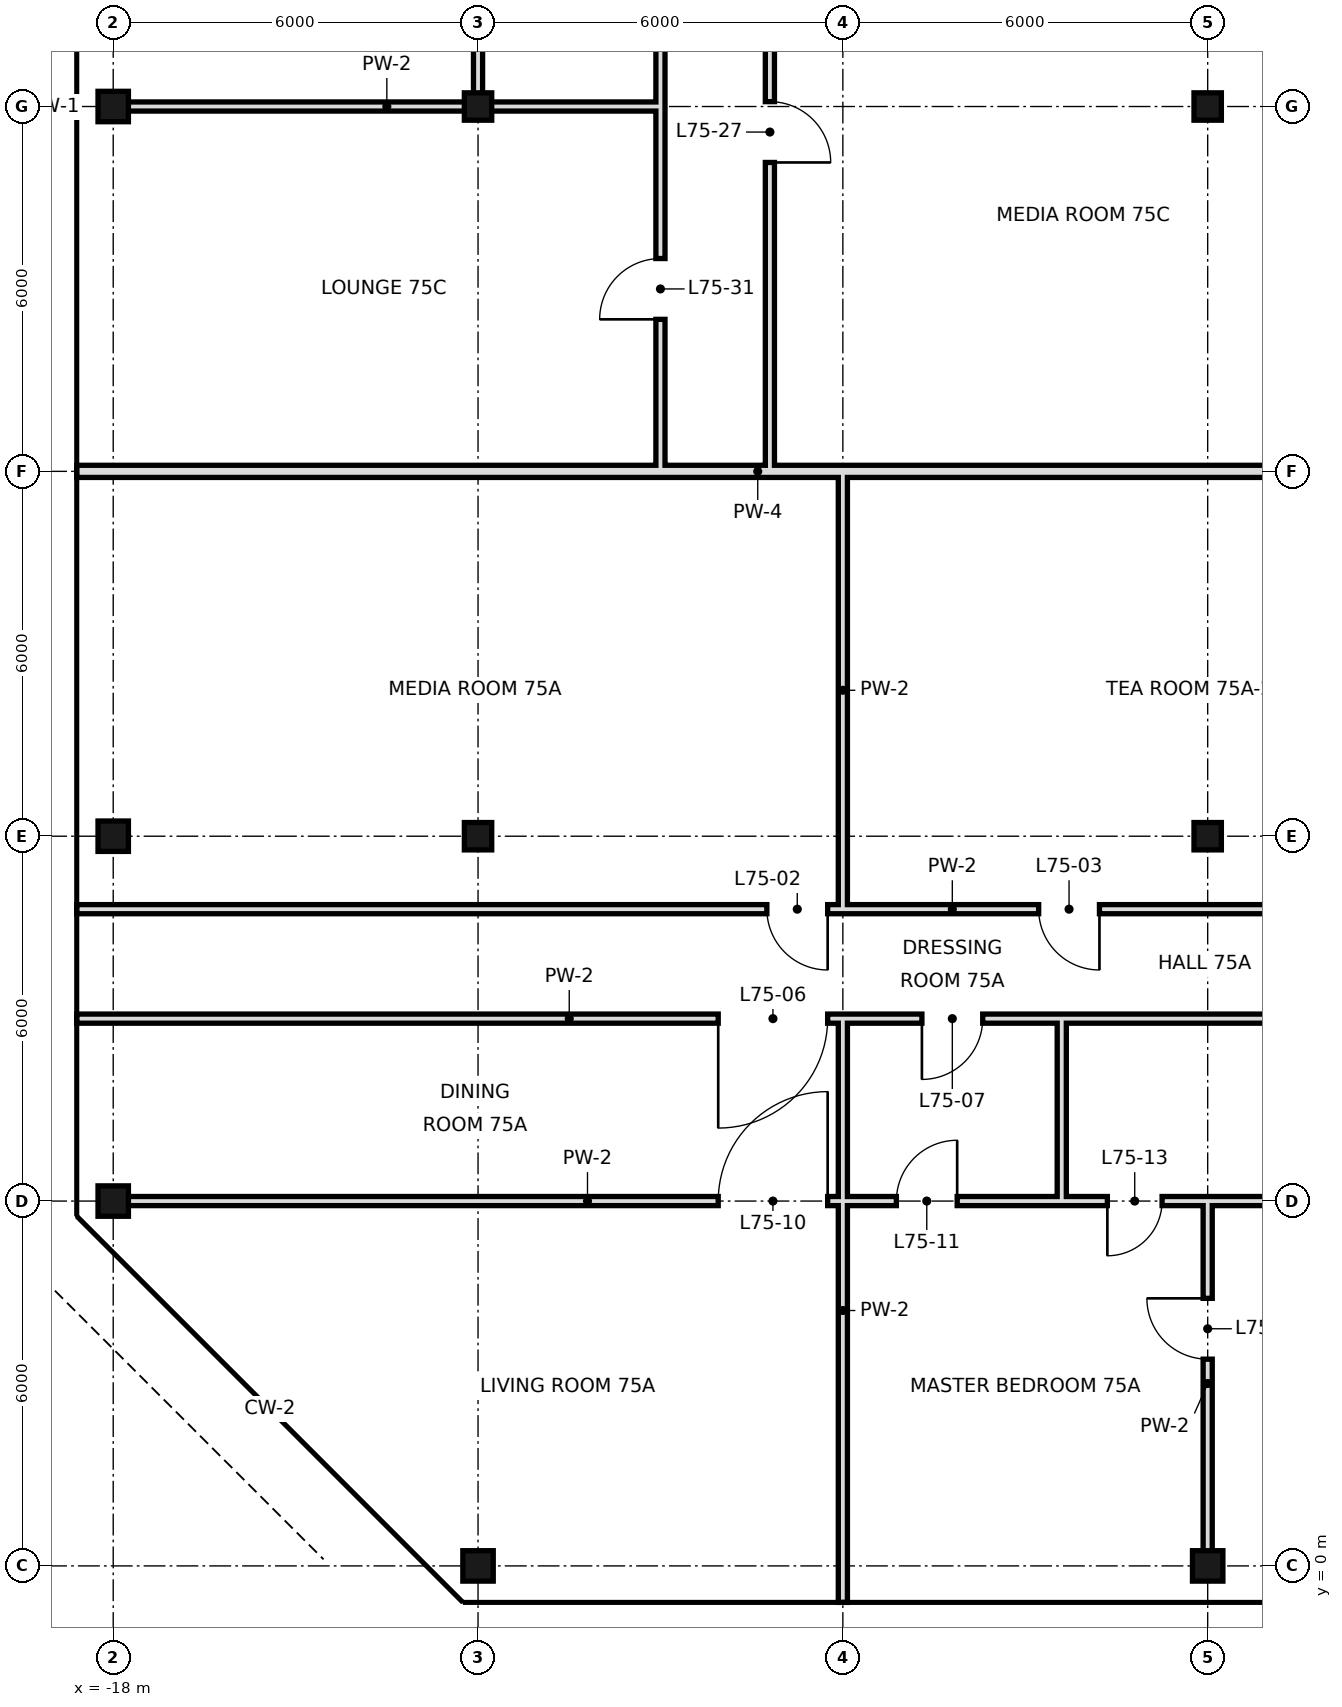
"""IFC4 building model, lengths in metres.
Left out: names, types, materials, properties, quantities, classifications, styles, units other than length and angle.
Written with IfcOpenShell. Run it as: python <this file> out.ifc"""

import sys

from ifc_helpers import new_model, si_unit, direction, frame, frame_2d, origin, origin_with_axes, origin_2d, place, context, subcontext, project, spatial, rectangle, hollow_rectangle, extrude, element, fill, save


model = new_model("IFC4")
c1 = context("Model", 3, precision=1e-05, world=origin(), true_north=direction((0.0, 1.0)))
c2 = subcontext(c1, "Body", "Model", "MODEL_VIEW")
j1 = project(units=[si_unit("LENGTHUNIT", "METRE"), si_unit("PLANEANGLEUNIT", "RADIAN")], contexts=[c1])
p1 = place(None, origin())
s1 = spatial("IfcSite", under=j1, at=p1, CompositionType="ELEMENT")
p2 = place(p1, origin())
s2 = spatial("IfcBuilding", under=s1, at=p2, CompositionType="ELEMENT")
p3 = place(p2, frame((0.0, 0.0, 316.0)))
s3 = spatial("IfcBuildingStorey", under=s2, at=p3, CompositionType="ELEMENT", Elevation=316.0)
for number, where, z_axis, x_axis in (
    (1, (-18.0, 6.0, 0.0), (0.0, 0.0, 1.0), (1.0, 0.0, 0.0)),
    (2, (-18.0, 12.0, 0.0), (0.0, 0.0, 1.0), (1.0, 0.0, 0.0)),
    (3, (-18.0, 24.0, 0.0), (0.0, 0.0, 1.0), (1.0, 0.0, 0.0)),
    (4, (-12.0, 0.0, 0.0), (0.0, 0.0, 1.0), (1.0, 0.0, 0.0)),
):
    element("IfcColumn", number, at=place(p3, frame(where, z_axis=z_axis, x_axis=x_axis)), inside=s3, PredefinedType="COLUMN", context=c2, shape_type="SweptSolid", body=[
        extrude(hollow_rectangle(XDim=0.5, YDim=0.5, WallThickness=0.025, at=origin_2d()), origin(), (0.0, 0.0, 1.0), 3.6),
    ])
for number, where, z_axis, x_axis in (
    (5, (-12.0, 12.0, 0.0), (0.0, 0.0, 1.0), (1.0, 0.0, 0.0)),
    (6, (-12.0, 24.0, 0.0), (0.0, 0.0, 1.0), (1.0, 0.0, 0.0)),
):
    element("IfcColumn", number, at=place(p3, frame(where, z_axis=z_axis, x_axis=x_axis)), inside=s3, PredefinedType="COLUMN", context=c2, shape_type="SweptSolid", body=[
        extrude(hollow_rectangle(XDim=0.45, YDim=0.45, WallThickness=0.022, at=origin_2d()), origin(), (0.0, 0.0, 1.0), 3.6),
    ])
p4 = place(p3, origin_with_axes())
e7 = element("IfcColumn", 7, at=p4, inside=s3, PredefinedType="COLUMN", context=c2, shape_type="SweptSolid", body=[
    extrude(hollow_rectangle(XDim=0.5, YDim=0.5, WallThickness=0.025, at=origin_2d()), origin(), (0.0, 0.0, 1.0), 3.6),
])
for number, where, z_axis, x_axis in (
    (8, (0.0, 12.0, 0.0), (0.0, 0.0, 1.0), (1.0, 0.0, 0.0)),
    (9, (0.0, 24.0, 0.0), (0.0, 0.0, 1.0), (1.0, 0.0, 0.0)),
):
    element("IfcColumn", number, at=place(p3, frame(where, z_axis=z_axis, x_axis=x_axis)), inside=s3, PredefinedType="COLUMN", context=c2, shape_type="SweptSolid", body=[
        extrude(hollow_rectangle(XDim=0.45, YDim=0.45, WallThickness=0.022, at=origin_2d()), origin(), (0.0, 0.0, 1.0), 3.6),
    ])
p5 = place(p3, frame((-12.0, 24.0, 0.0), z_axis=(0.0, 0.0, 1.0), x_axis=(0.0, 1.0, 0.0)))
e10 = element("IfcWall", 10, at=p5, inside=s3, PredefinedType="PARTITIONING", context=c2, shape_type="SweptSolid", body=[
    extrude(rectangle(XDim=12.0, YDim=0.15, at=frame_2d((6.0, 0.0))), origin(), (0.0, 0.0, 1.0), 2.72),
])
p6 = place(p5, frame((5.1, 0.0, 0.0)))
e11 = element("IfcOpeningElement", 11, at=p6, cuts=e10, PredefinedType="OPENING", context=c2, shape_type="SweptSolid", body=[
    extrude(rectangle(XDim=1.8, YDim=2.4, at=frame_2d((0.9, 1.2))), frame((0.0, 0.085, 0.0), z_axis=(0.0, -1.0, 0.0), x_axis=(1.0, 0.0, 0.0)), (0.0, 0.0, 1.0), 0.17),
])
p7 = place(p3, frame((-2.4, 6.0, 0.0), z_axis=(0.0, 0.0, 1.0), x_axis=(0.0, 1.0, 0.0)))
e12 = element("IfcWall", 12, at=p7, inside=s3, PredefinedType="PARTITIONING", context=c2, shape_type="SweptSolid", body=[
    extrude(rectangle(XDim=3.0, YDim=0.15, at=frame_2d((1.5, 0.0))), origin(), (0.0, 0.0, 1.0), 3.42),
])
p8 = place(p3, frame((-6.0, -0.6, 0.0), z_axis=(0.0, 0.0, 1.0), x_axis=(0.0, 1.0, 0.0)))
e13 = element("IfcWall", 13, at=p8, inside=s3, PredefinedType="PARTITIONING", context=c2, shape_type="SweptSolid", body=[
    extrude(rectangle(XDim=9.6, YDim=0.15, at=frame_2d((4.8, 0.0))), origin(), (0.0, 0.0, 1.0), 3.42),
])
p9 = place(p3, frame((-6.0, 10.8, 0.0), z_axis=(0.0, 0.0, 1.0), x_axis=(0.0, 1.0, 0.0)))
e14 = element("IfcWall", 14, at=p9, inside=s3, PredefinedType="PARTITIONING", context=c2, shape_type="SweptSolid", body=[
    extrude(rectangle(XDim=7.2, YDim=0.15, at=frame_2d((3.6, 0.0))), origin(), (0.0, 0.0, 1.0), 3.42),
])
p10 = place(p3, frame((-7.2, 18.0, 0.0), z_axis=(0.0, 0.0, 1.0), x_axis=(0.0, 1.0, 0.0)))
e15 = element("IfcWall", 15, at=p10, inside=s3, PredefinedType="PARTITIONING", context=c2, shape_type="SweptSolid", body=[
    extrude(rectangle(XDim=23.4, YDim=0.15, at=frame_2d((11.7, 0.0))), origin(), (0.0, 0.0, 1.0), 3.42),
])
p11 = place(p10, frame((9.7, 0.0, 0.0)))
e16 = element("IfcOpeningElement", 16, at=p11, cuts=e15, PredefinedType="OPENING", context=c2, shape_type="SweptSolid", body=[
    extrude(rectangle(XDim=1.0, YDim=2.4, at=frame_2d((0.5, 1.2))), frame((0.0, 0.085, 0.0), z_axis=(0.0, -1.0, 0.0), x_axis=(1.0, 0.0, 0.0)), (0.0, 0.0, 1.0), 0.17),
])
p12 = place(p10, frame((5.08, 0.0, 0.0)))
e17 = element("IfcOpeningElement", 17, at=p12, cuts=e15, PredefinedType="OPENING", context=c2, shape_type="SweptSolid", body=[
    extrude(rectangle(XDim=1.0, YDim=2.4, at=frame_2d((0.5, 1.2))), frame((0.0, 0.085, 0.0), z_axis=(0.0, -1.0, 0.0), x_axis=(1.0, 0.0, 0.0)), (0.0, 0.0, 1.0), 0.17),
])
p13 = place(p10, frame((15.22, 0.0, 0.0)))
e18 = element("IfcOpeningElement", 18, at=p13, cuts=e15, PredefinedType="OPENING", context=c2, shape_type="SweptSolid", body=[
    extrude(rectangle(XDim=1.0, YDim=2.4, at=frame_2d((0.5, 1.2))), frame((0.0, 0.085, 0.0), z_axis=(0.0, -1.0, 0.0), x_axis=(1.0, 0.0, 0.0)), (0.0, 0.0, 1.0), 0.17),
])
p14 = place(p3, frame((-9.0, 18.0, 0.0), z_axis=(0.0, 0.0, 1.0), x_axis=(0.0, 1.0, 0.0)))
e19 = element("IfcWall", 19, at=p14, inside=s3, PredefinedType="PARTITIONING", context=c2, shape_type="SweptSolid", body=[
    extrude(rectangle(XDim=18.0, YDim=0.15, at=frame_2d((9.0, 0.0))), origin(), (0.0, 0.0, 1.0), 3.42),
])
p15 = place(p14, frame((2.5, 0.0, 0.0)))
e20 = element("IfcOpeningElement", 20, at=p15, cuts=e19, PredefinedType="OPENING", context=c2, shape_type="SweptSolid", body=[
    extrude(rectangle(XDim=1.0, YDim=2.4, at=frame_2d((0.5, 1.2))), frame((0.0, 0.085, 0.0), z_axis=(0.0, -1.0, 0.0), x_axis=(1.0, 0.0, 0.0)), (0.0, 0.0, 1.0), 0.17),
])
p16 = place(p14, frame((13.04, 0.0, 0.0)))
e21 = element("IfcOpeningElement", 21, at=p16, cuts=e19, PredefinedType="OPENING", context=c2, shape_type="SweptSolid", body=[
    extrude(rectangle(XDim=1.8, YDim=2.4, at=frame_2d((0.9, 1.2))), frame((0.0, 0.085, 0.0), z_axis=(0.0, -1.0, 0.0), x_axis=(1.0, 0.0, 0.0)), (0.0, 0.0, 1.0), 0.17),
])
p17 = place(p3, frame((0.0, 0.0, 0.0), z_axis=(0.0, 0.0, 1.0), x_axis=(0.0, 1.0, 0.0)))
e22 = element("IfcWall", 22, at=p17, inside=s3, PredefinedType="PARTITIONING", context=c2, shape_type="SweptSolid", body=[
    extrude(rectangle(XDim=6.0, YDim=0.15, at=frame_2d((3.0, 0.0))), origin(), (0.0, 0.0, 1.0), 2.72),
])
p18 = place(p17, frame((3.4, 0.0, 0.0)))
e23 = element("IfcOpeningElement", 23, at=p18, cuts=e22, PredefinedType="OPENING", context=c2, shape_type="SweptSolid", body=[
    extrude(rectangle(XDim=1.0, YDim=2.4, at=frame_2d((0.5, 1.2))), frame((0.0, 0.085, 0.0), z_axis=(0.0, -1.0, 0.0), x_axis=(1.0, 0.0, 0.0)), (0.0, 0.0, 1.0), 0.17),
])
p19 = place(p3, frame((-18.6, 10.8, 0.0), z_axis=(0.0, 0.0, 1.0), x_axis=(1.0, 0.0, 0.0)))
e24 = element("IfcWall", 24, at=p19, inside=s3, PredefinedType="PARTITIONING", context=c2, shape_type="SweptSolid", body=[
    extrude(rectangle(XDim=28.8, YDim=0.15, at=frame_2d((14.4, 0.0))), origin(), (0.0, 0.0, 1.0), 3.42),
])
p20 = place(p19, frame((25.9, 0.0, 0.0)))
e25 = element("IfcOpeningElement", 25, at=p20, cuts=e24, PredefinedType="OPENING", context=c2, shape_type="SweptSolid", body=[
    extrude(rectangle(XDim=1.0, YDim=2.4, at=frame_2d((0.5, 1.2))), frame((0.0, 0.085, 0.0), z_axis=(0.0, -1.0, 0.0), x_axis=(1.0, 0.0, 0.0)), (0.0, 0.0, 1.0), 0.17),
])
p21 = place(p19, frame((11.35, 0.0, 0.0)))
e26 = element("IfcOpeningElement", 26, at=p21, cuts=e24, PredefinedType="OPENING", context=c2, shape_type="SweptSolid", body=[
    extrude(rectangle(XDim=1.0, YDim=2.4, at=frame_2d((0.5, 1.2))), frame((0.0, 0.085, 0.0), z_axis=(0.0, -1.0, 0.0), x_axis=(1.0, 0.0, 0.0)), (0.0, 0.0, 1.0), 0.17),
])
p22 = place(p19, frame((15.82, 0.0, 0.0)))
e27 = element("IfcOpeningElement", 27, at=p22, cuts=e24, PredefinedType="OPENING", context=c2, shape_type="SweptSolid", body=[
    extrude(rectangle(XDim=1.0, YDim=2.4, at=frame_2d((0.5, 1.2))), frame((0.0, 0.085, 0.0), z_axis=(0.0, -1.0, 0.0), x_axis=(1.0, 0.0, 0.0)), (0.0, 0.0, 1.0), 0.17),
])
p23 = place(p3, frame((-18.6, 18.0, 0.0), z_axis=(0.0, 0.0, 1.0), x_axis=(1.0, 0.0, 0.0)))
e28 = element("IfcWall", 28, at=p23, inside=s3, PredefinedType="SOLIDWALL", context=c2, shape_type="SweptSolid", body=[
    extrude(rectangle(XDim=21.7, YDim=0.2, at=frame_2d((10.85, 0.0))), origin(), (0.0, 0.0, 1.0), 2.72),
])
p24 = place(p3, frame((-18.0, 24.0, 0.0), z_axis=(0.0, 0.0, 1.0), x_axis=(1.0, 0.0, 0.0)))
e29 = element("IfcWall", 29, at=p24, inside=s3, PredefinedType="PARTITIONING", context=c2, shape_type="SweptSolid", body=[
    extrude(rectangle(XDim=9.0, YDim=0.15, at=frame_2d((4.5, 0.0))), origin(), (0.0, 0.0, 1.0), 2.72),
])
p25 = place(p3, frame((-18.0, 6.0, 0.0), z_axis=(0.0, 0.0, 1.0), x_axis=(1.0, 0.0, 0.0)))
e30 = element("IfcWall", 30, at=p25, inside=s3, PredefinedType="PARTITIONING", context=c2, shape_type="SweptSolid", body=[
    extrude(rectangle(XDim=15.6, YDim=0.15, at=frame_2d((7.8, 0.0))), origin(), (0.0, 0.0, 1.0), 2.72),
])
p26 = place(p25, frame((9.95, 0.0, 0.0)))
e31 = element("IfcOpeningElement", 31, at=p26, cuts=e30, PredefinedType="OPENING", context=c2, shape_type="SweptSolid", body=[
    extrude(rectangle(XDim=1.8, YDim=2.4, at=frame_2d((0.9, 1.2))), frame((0.0, 0.085, 0.0), z_axis=(0.0, -1.0, 0.0), x_axis=(1.0, 0.0, 0.0)), (0.0, 0.0, 1.0), 0.17),
])
p27 = place(p25, frame((12.88, 0.0, 0.0)))
e32 = element("IfcOpeningElement", 32, at=p27, cuts=e30, PredefinedType="OPENING", context=c2, shape_type="SweptSolid", body=[
    extrude(rectangle(XDim=1.0, YDim=2.4, at=frame_2d((0.5, 1.2))), frame((0.0, 0.085, 0.0), z_axis=(0.0, -1.0, 0.0), x_axis=(1.0, 0.0, 0.0)), (0.0, 0.0, 1.0), 0.17),
])
p28 = place(p3, frame((-2.4, 6.0, 0.0), z_axis=(0.0, 0.0, 1.0), x_axis=(1.0, 0.0, 0.0)))
e33 = element("IfcWall", 33, at=p28, inside=s3, PredefinedType="PARTITIONING", context=c2, shape_type="SweptSolid", body=[
    extrude(rectangle(XDim=8.4, YDim=0.15, at=frame_2d((4.2, 0.0))), origin(), (0.0, 0.0, 1.0), 2.72),
])
p29 = place(p28, frame((0.75, 0.0, 0.0)))
e34 = element("IfcOpeningElement", 34, at=p29, cuts=e33, PredefinedType="OPENING", context=c2, shape_type="SweptSolid", body=[
    extrude(rectangle(XDim=0.9, YDim=2.4, at=frame_2d((0.45, 1.2))), frame((0.0, 0.085, 0.0), z_axis=(0.0, -1.0, 0.0), x_axis=(1.0, 0.0, 0.0)), (0.0, 0.0, 1.0), 0.17),
])
p30 = place(p3, frame((-18.6, 9.0, 0.0), z_axis=(0.0, 0.0, 1.0), x_axis=(1.0, 0.0, 0.0)))
e35 = element("IfcWall", 35, at=p30, inside=s3, PredefinedType="PARTITIONING", context=c2, shape_type="SweptSolid", body=[
    extrude(rectangle(XDim=16.2, YDim=0.15, at=frame_2d((8.1, 0.0))), origin(), (0.0, 0.0, 1.0), 3.42),
])
p31 = place(p30, frame((10.55, 0.0, 0.0)))
e36 = element("IfcOpeningElement", 36, at=p31, cuts=e35, PredefinedType="OPENING", context=c2, shape_type="SweptSolid", body=[
    extrude(rectangle(XDim=1.8, YDim=2.4, at=frame_2d((0.9, 1.2))), frame((0.0, 0.085, 0.0), z_axis=(0.0, -1.0, 0.0), x_axis=(1.0, 0.0, 0.0)), (0.0, 0.0, 1.0), 0.17),
])
p32 = place(p30, frame((13.9, 0.0, 0.0)))
e37 = element("IfcOpeningElement", 37, at=p32, cuts=e35, PredefinedType="OPENING", context=c2, shape_type="SweptSolid", body=[
    extrude(rectangle(XDim=1.0, YDim=2.4, at=frame_2d((0.5, 1.2))), frame((0.0, 0.085, 0.0), z_axis=(0.0, -1.0, 0.0), x_axis=(1.0, 0.0, 0.0)), (0.0, 0.0, 1.0), 0.17),
])
p33 = place(p3, frame((-2.4, 9.0, 0.0), z_axis=(0.0, 0.0, 1.0), x_axis=(1.0, 0.0, 0.0)))
e38 = element("IfcWall", 38, at=p33, inside=s3, PredefinedType="PARTITIONING", context=c2, shape_type="SweptSolid", body=[
    extrude(rectangle(XDim=8.4, YDim=0.15, at=frame_2d((4.2, 0.0))), origin(), (0.0, 0.0, 1.0), 3.42),
])
p34 = place(p21, origin())
e39 = element("IfcDoor", 39, at=p34, inside=s3, OperationType="SINGLE_SWING_RIGHT", PredefinedType="DOOR", context=c2, shape_type="SweptSolid", body=[
    extrude(rectangle(XDim=1.0, YDim=2.4, at=frame_2d((0.5, 1.2))), frame((0.0, 0.025, 0.0), z_axis=(0.0, -1.0, 0.0), x_axis=(1.0, 0.0, 0.0)), (0.0, 0.0, 1.0), 0.05),
])
fill(e26, e39)
p35 = place(p22, origin())
e40 = element("IfcDoor", 40, at=p35, inside=s3, OperationType="SINGLE_SWING_RIGHT", PredefinedType="DOOR", context=c2, shape_type="SweptSolid", body=[
    extrude(rectangle(XDim=1.0, YDim=2.4, at=frame_2d((0.5, 1.2))), frame((0.0, 0.025, 0.0), z_axis=(0.0, -1.0, 0.0), x_axis=(1.0, 0.0, 0.0)), (0.0, 0.0, 1.0), 0.05),
])
fill(e27, e40)
p36 = place(p31, frame((1.8, 0.0, 0.0), z_axis=(0.0, 0.0, 1.0), x_axis=(-1.0, 0.0, 0.0)))
e41 = element("IfcDoor", 41, at=p36, inside=s3, OperationType="SINGLE_SWING_RIGHT", PredefinedType="DOOR", context=c2, shape_type="SweptSolid", body=[
    extrude(rectangle(XDim=1.8, YDim=2.4, at=frame_2d((0.9, 1.2))), frame((0.0, 0.025, 0.0), z_axis=(0.0, -1.0, 0.0), x_axis=(1.0, 0.0, 0.0)), (0.0, 0.0, 1.0), 0.05),
])
fill(e36, e41)
p37 = place(p32, frame((1.0, 0.0, 0.0), z_axis=(0.0, 0.0, 1.0), x_axis=(-1.0, 0.0, 0.0)))
e42 = element("IfcDoor", 42, at=p37, inside=s3, OperationType="SINGLE_SWING_RIGHT", PredefinedType="DOOR", context=c2, shape_type="SweptSolid", body=[
    extrude(rectangle(XDim=1.0, YDim=2.4, at=frame_2d((0.5, 1.2))), frame((0.0, 0.025, 0.0), z_axis=(0.0, -1.0, 0.0), x_axis=(1.0, 0.0, 0.0)), (0.0, 0.0, 1.0), 0.05),
])
fill(e37, e42)
p38 = place(p26, frame((1.8, 0.0, 0.0), z_axis=(0.0, 0.0, 1.0), x_axis=(-1.0, 0.0, 0.0)))
e43 = element("IfcDoor", 43, at=p38, inside=s3, OperationType="SINGLE_SWING_LEFT", PredefinedType="DOOR", context=c2, shape_type="SweptSolid", body=[
    extrude(rectangle(XDim=1.8, YDim=2.4, at=frame_2d((0.9, 1.2))), frame((0.0, 0.025, 0.0), z_axis=(0.0, -1.0, 0.0), x_axis=(1.0, 0.0, 0.0)), (0.0, 0.0, 1.0), 0.05),
])
fill(e31, e43)
p39 = place(p27, frame((1.0, 0.0, 0.0), z_axis=(0.0, 0.0, 1.0), x_axis=(-1.0, 0.0, 0.0)))
e44 = element("IfcDoor", 44, at=p39, inside=s3, OperationType="SINGLE_SWING_LEFT", PredefinedType="DOOR", context=c2, shape_type="SweptSolid", body=[
    extrude(rectangle(XDim=1.0, YDim=2.4, at=frame_2d((0.5, 1.2))), frame((0.0, 0.025, 0.0), z_axis=(0.0, -1.0, 0.0), x_axis=(1.0, 0.0, 0.0)), (0.0, 0.0, 1.0), 0.05),
])
fill(e32, e44)
p40 = place(p18, frame((1.0, 0.0, 0.0), z_axis=(0.0, 0.0, 1.0), x_axis=(-1.0, 0.0, 0.0)))
e45 = element("IfcDoor", 45, at=p40, inside=s3, OperationType="SINGLE_SWING_LEFT", PredefinedType="DOOR", context=c2, shape_type="SweptSolid", body=[
    extrude(rectangle(XDim=1.0, YDim=2.4, at=frame_2d((0.5, 1.2))), frame((0.0, 0.025, 0.0), z_axis=(0.0, -1.0, 0.0), x_axis=(1.0, 0.0, 0.0)), (0.0, 0.0, 1.0), 0.05),
])
fill(e23, e45)
p41 = place(p29, frame((0.9, 0.0, 0.0), z_axis=(0.0, 0.0, 1.0), x_axis=(-1.0, 0.0, 0.0)))
e46 = element("IfcDoor", 46, at=p41, inside=s3, OperationType="SINGLE_SWING_RIGHT", PredefinedType="DOOR", context=c2, shape_type="SweptSolid", body=[
    extrude(rectangle(XDim=0.9, YDim=2.4, at=frame_2d((0.45, 1.2))), frame((0.0, 0.025, 0.0), z_axis=(0.0, -1.0, 0.0), x_axis=(1.0, 0.0, 0.0)), (0.0, 0.0, 1.0), 0.05),
])
fill(e34, e46)
p42 = place(p12, frame((1.0, 0.0, 0.0), z_axis=(0.0, 0.0, 1.0), x_axis=(-1.0, 0.0, 0.0)))
e47 = element("IfcDoor", 47, at=p42, inside=s3, OperationType="SINGLE_SWING_RIGHT", PredefinedType="DOOR", context=c2, shape_type="SweptSolid", body=[
    extrude(rectangle(XDim=1.0, YDim=2.4, at=frame_2d((0.5, 1.2))), frame((0.0, 0.025, 0.0), z_axis=(0.0, -1.0, 0.0), x_axis=(1.0, 0.0, 0.0)), (0.0, 0.0, 1.0), 0.05),
])
fill(e17, e47)
p43 = place(p15, origin())
e48 = element("IfcDoor", 48, at=p43, inside=s3, OperationType="SINGLE_SWING_LEFT", PredefinedType="DOOR", context=c2, shape_type="SweptSolid", body=[
    extrude(rectangle(XDim=1.0, YDim=2.4, at=frame_2d((0.5, 1.2))), frame((0.0, 0.025, 0.0), z_axis=(0.0, -1.0, 0.0), x_axis=(1.0, 0.0, 0.0)), (0.0, 0.0, 1.0), 0.05),
])
fill(e20, e48)
save(model, sys.argv[1])
